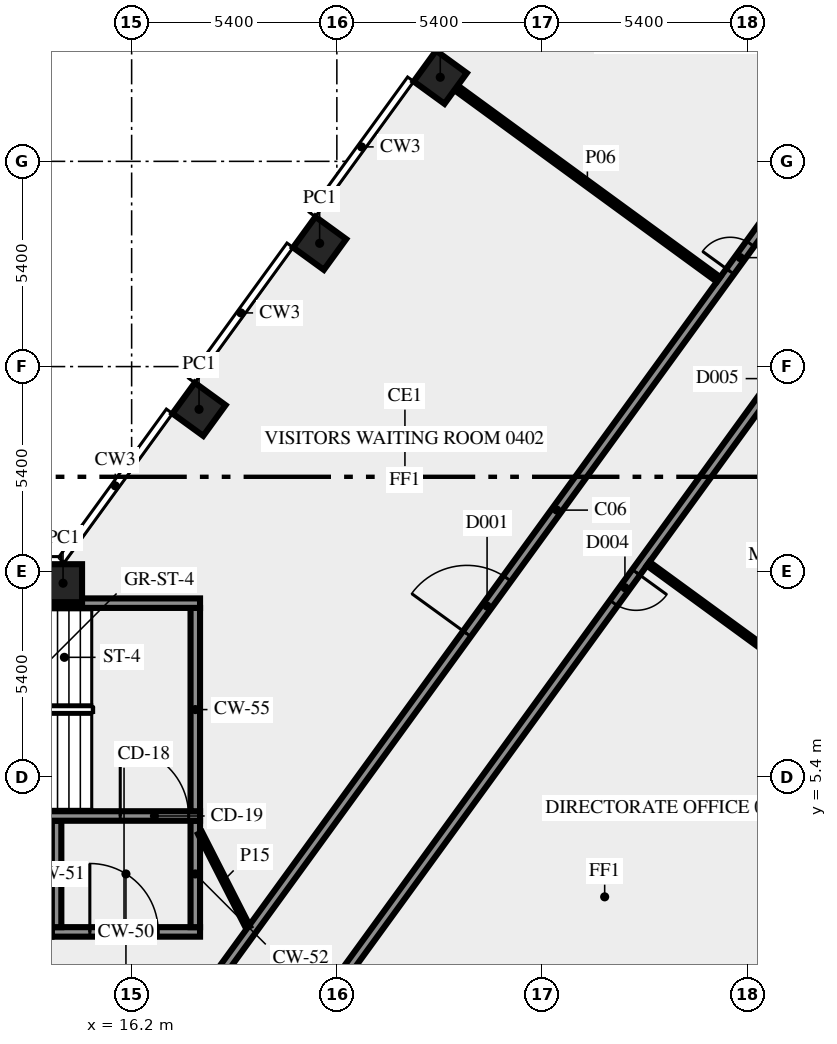
"""IFC4 building model, lengths in metres.
Left out: names, types, materials, properties, quantities, classifications, styles, units other than length and angle.
Written with IfcOpenShell. Run it as: python <this file> out.ifc"""

import sys

from ifc_helpers import new_model, si_unit, direction, frame, frame_2d, origin, origin_2d, place, context, subcontext, project, spatial, rectangle, extrude, element, fill, save


model = new_model("IFC4")
c1 = context("Model", 3, precision=1e-05, world=origin(), true_north=direction((0.0, 1.0)))
c2 = subcontext(c1, "Body", "Model", "MODEL_VIEW")
j1 = project(units=[si_unit("LENGTHUNIT", "METRE"), si_unit("PLANEANGLEUNIT", "RADIAN")], contexts=[c1])
p1 = place(None, origin())
s1 = spatial("IfcSite", under=j1, at=p1, CompositionType="ELEMENT")
p2 = place(p1, origin())
s2 = spatial("IfcBuilding", under=s1, at=p2, CompositionType="ELEMENT")
p3 = place(p2, frame((0.0, 0.0, 20.5)))
s3 = spatial("IfcBuildingStorey", under=s2, at=p3, CompositionType="ELEMENT", Elevation=20.5)
for number, where, z_axis, x_axis in (
    (1, (24.321, 23.812, 0.0), (0.0, 0.0, 1.0), (-0.588, -0.809, 0.0)),
    (2, (21.147, 19.444, 0.0), (0.0, 0.0, 1.0), (-0.588, -0.809, 0.0)),
    (3, (17.974, 15.075, 0.0), (0.0, 0.0, 1.0), (-0.588, -0.809, 0.0)),
    (4, (14.395, 10.5, 0.0), (0.0, 0.0, 1.0), (-1.0, 0.0, 0.0)),
):
    element("IfcColumn", number, at=place(p3, frame(where, z_axis=z_axis, x_axis=x_axis)), inside=s3, PredefinedType="COLUMN", context=c2, shape_type="SweptSolid", body=[
        extrude(rectangle(XDim=1.0, YDim=1.0, at=origin_2d()), origin(), (0.0, 0.0, 1.0), 3.9),
    ])
p4 = place(p3, frame((14.1, 1.325, 0.0), z_axis=(0.0, 0.0, 1.0), x_axis=(1.0, 0.0, 0.0)))
e5 = element("IfcWall", 5, at=p4, inside=s3, PredefinedType="SHEAR", context=c2, shape_type="SweptSolid", body=[
    extrude(rectangle(XDim=3.9, YDim=0.25, at=frame_2d((1.95, 0.0))), origin(), (0.0, 0.0, 1.0), 3.9),
])
p5 = place(p4, frame((1.0, 0.0, 0.0)))
e6 = element("IfcOpeningElement", 6, at=p5, cuts=e5, PredefinedType="OPENING", context=c2, shape_type="SweptSolid", body=[
    extrude(rectangle(XDim=1.8, YDim=2.1, at=frame_2d((0.9, 1.05))), frame((0.0, 0.135, 0.0), z_axis=(0.0, -1.0, 0.0), x_axis=(1.0, 0.0, 0.0)), (0.0, 0.0, 1.0), 0.27),
])
for number, where, z_axis, x_axis in (
    (7, (14.225, 1.45, 0.0), (0.0, 0.0, 1.0), (0.0, 1.0, 0.0)),
    (8, (17.875, 1.45, 0.0), (0.0, 0.0, 1.0), (0.0, 1.0, 0.0)),
):
    element("IfcWall", number, at=place(p3, frame(where, z_axis=z_axis, x_axis=x_axis)), inside=s3, PredefinedType="SHEAR", context=c2, shape_type="SweptSolid", body=[
        extrude(rectangle(XDim=2.8, YDim=0.25, at=frame_2d((1.4, 0.0))), origin(), (0.0, 0.0, 1.0), 3.9),
    ])
p6 = place(p3, frame((7.5, 4.375, 0.0), z_axis=(0.0, 0.0, 1.0), x_axis=(1.0, 0.0, 0.0)))
e9 = element("IfcWall", 9, at=p6, inside=s3, PredefinedType="SHEAR", context=c2, shape_type="SweptSolid", body=[
    extrude(rectangle(XDim=10.5, YDim=0.25, at=frame_2d((5.25, 0.0))), origin(), (0.0, 0.0, 1.0), 3.9),
])
p7 = place(p6, frame((8.4, 0.0, 0.0)))
e10 = element("IfcOpeningElement", 10, at=p7, cuts=e9, PredefinedType="OPENING", context=c2, shape_type="SweptSolid", body=[
    extrude(rectangle(XDim=1.8, YDim=2.1, at=frame_2d((0.9, 1.05))), frame((0.0, 0.135, 0.0), z_axis=(0.0, -1.0, 0.0), x_axis=(1.0, 0.0, 0.0)), (0.0, 0.0, 1.0), 0.27),
])
p8 = place(p3, frame((17.875, 4.5, 0.0), z_axis=(0.0, 0.0, 1.0), x_axis=(0.0, 1.0, 0.0)))
e11 = element("IfcWall", 11, at=p8, inside=s3, PredefinedType="SHEAR", context=c2, shape_type="SweptSolid", body=[
    extrude(rectangle(XDim=5.35, YDim=0.25, at=frame_2d((2.675, 0.0))), origin(), (0.0, 0.0, 1.0), 3.9),
])
p9 = place(p3, frame((7.5, 9.975, 0.0), z_axis=(0.0, 0.0, 1.0), x_axis=(1.0, 0.0, 0.0)))
e12 = element("IfcWall", 12, at=p9, inside=s3, PredefinedType="SHEAR", context=c2, shape_type="SweptSolid", body=[
    extrude(rectangle(XDim=10.5, YDim=0.25, at=frame_2d((5.25, 0.0))), origin(), (0.0, 0.0, 1.0), 3.9),
])
p10 = place(p9, frame((2.0, 0.0, 1.0)))
e13 = element("IfcOpeningElement", 13, at=p10, cuts=e12, PredefinedType="OPENING", context=c2, shape_type="SweptSolid", body=[
    extrude(rectangle(XDim=1.2, YDim=1.2, at=frame_2d((0.6, 0.6))), frame((0.0, 0.135, 0.0), z_axis=(0.0, -1.0, 0.0), x_axis=(1.0, 0.0, 0.0)), (0.0, 0.0, 1.0), 0.27),
])
p11 = place(p3, frame((49.869, 38.856, 0.0), z_axis=(0.0, 0.0, 1.0), x_axis=(-0.587784522481, -0.809017524614, 0.0)))
e14 = element("IfcWall", 14, at=p11, inside=s3, PredefinedType="SOLIDWALL", context=c2, shape_type="SweptSolid", body=[
    extrude(rectangle(XDim=49.912, YDim=0.25, at=frame_2d((24.956, 0.0))), origin(), (0.0, 0.0, 1.0), 3.9),
])
p12 = place(p11, frame((27.946, 0.0, 0.0)))
e15 = element("IfcOpeningElement", 15, at=p12, cuts=e14, PredefinedType="OPENING", context=c2, shape_type="SweptSolid", body=[
    extrude(rectangle(XDim=0.9, YDim=2.1, at=frame_2d((0.45, 1.05))), frame((0.0, 0.135, 0.0), z_axis=(0.0, -1.0, 0.0), x_axis=(1.0, 0.0, 0.0)), (0.0, 0.0, 1.0), 0.27),
])
p13 = place(p11, frame((34.697, 0.0, 0.0)))
e16 = element("IfcOpeningElement", 16, at=p13, cuts=e14, PredefinedType="OPENING", context=c2, shape_type="SweptSolid", body=[
    extrude(rectangle(XDim=1.0, YDim=2.1, at=frame_2d((0.5, 1.05))), frame((0.0, 0.135, 0.0), z_axis=(0.0, -1.0, 0.0), x_axis=(1.0, 0.0, 0.0)), (0.0, 0.0, 1.0), 0.27),
])
p14 = place(p11, frame((15.797, 0.0, 0.0)))
e17 = element("IfcOpeningElement", 17, at=p14, cuts=e14, PredefinedType="OPENING", context=c2, shape_type="SweptSolid", body=[
    extrude(rectangle(XDim=0.9, YDim=2.1, at=frame_2d((0.45, 1.05))), frame((0.0, 0.135, 0.0), z_axis=(0.0, -1.0, 0.0), x_axis=(1.0, 0.0, 0.0)), (0.0, 0.0, 1.0), 0.27),
])
p15 = place(p11, frame((14.196, 0.0, 0.0)))
e18 = element("IfcOpeningElement", 18, at=p15, cuts=e14, PredefinedType="OPENING", context=c2, shape_type="SweptSolid", body=[
    extrude(rectangle(XDim=0.9, YDim=2.1, at=frame_2d((0.45, 1.05))), frame((0.0, 0.135, 0.0), z_axis=(0.0, -1.0, 0.0), x_axis=(1.0, 0.0, 0.0)), (0.0, 0.0, 1.0), 0.27),
])
p16 = place(p3, frame((17.545, -1.125, 0.0), z_axis=(0.0, 0.0, 1.0), x_axis=(0.587786323093, 0.809016216391, 0.0)))
e19 = element("IfcWall", 19, at=p16, inside=s3, PredefinedType="SOLIDWALL", context=c2, shape_type="SweptSolid", body=[
    extrude(rectangle(XDim=33.493, YDim=0.25, at=frame_2d((16.747, 0.0))), origin(), (0.0, 0.0, 1.0), 3.9),
])
p17 = place(p16, frame((24.508, 0.0, 0.0)))
e20 = element("IfcOpeningElement", 20, at=p17, cuts=e19, PredefinedType="OPENING", context=c2, shape_type="SweptSolid", body=[
    extrude(rectangle(XDim=0.9, YDim=2.1, at=frame_2d((0.45, 1.05))), frame((0.0, 0.135, 0.0), z_axis=(0.0, -1.0, 0.0), x_axis=(1.0, 0.0, 0.0)), (0.0, 0.0, 1.0), 0.27),
])
p18 = place(p16, frame((12.724, 0.0, 0.0)))
e21 = element("IfcOpeningElement", 21, at=p18, cuts=e19, PredefinedType="OPENING", context=c2, shape_type="SweptSolid", body=[
    extrude(rectangle(XDim=1.8, YDim=2.1, at=frame_2d((0.9, 1.05))), frame((0.0, 0.135, 0.0), z_axis=(0.0, -1.0, 0.0), x_axis=(1.0, 0.0, 0.0)), (0.0, 0.0, 1.0), 0.27),
])
p19 = place(p3, frame((29.793, 11.012, 0.0), z_axis=(0.0, 0.0, 1.0), x_axis=(0.807645841498, -0.589667868135, 0.0)))
e22 = element("IfcWall", 22, at=p19, inside=s3, PredefinedType="PARTITIONING", context=c2, shape_type="SweptSolid", body=[
    extrude(rectangle(XDim=9.551, YDim=0.12, at=frame_2d((4.775, 0.0))), origin(), (0.0, 0.0, 1.0), 2.9),
])
p20 = place(p3, frame((24.742, 23.532, 0.0), z_axis=(0.0, 0.0, 1.0), x_axis=(0.80760412282, -0.589725004391, 0.0)))
e23 = element("IfcWall", 23, at=p20, inside=s3, PredefinedType="PARTITIONING", context=c2, shape_type="SweptSolid", body=[
    extrude(rectangle(XDim=8.545, YDim=0.15, at=frame_2d((4.272, 0.0))), origin(), (0.0, 0.0, 1.0), 3.9),
])
p21 = place(p3, frame((18.0, 3.925, 0.0), z_axis=(0.0, 0.0, 1.0), x_axis=(0.453950796792, -0.891026752736, 0.0)))
e24 = element("IfcWall", 24, at=p21, inside=s3, PredefinedType="PARTITIONING", context=c2, shape_type="SweptSolid", body=[
    extrude(rectangle(XDim=2.778, YDim=0.12, at=frame_2d((1.389, 0.0))), origin(), (0.0, 0.0, 1.0), 3.9),
])
p22 = place(p5, origin())
e25 = element("IfcDoor", 25, at=p22, inside=s3, OperationType="DOUBLE_DOOR_SINGLE_SWING", PredefinedType="DOOR", context=c2, shape_type="SweptSolid", body=[
    extrude(rectangle(XDim=1.8, YDim=2.1, at=frame_2d((0.9, 1.05))), frame((0.0, 0.025, 0.0), z_axis=(0.0, -1.0, 0.0), x_axis=(1.0, 0.0, 0.0)), (0.0, 0.0, 1.0), 0.05),
])
fill(e6, e25)
p23 = place(p7, origin())
e26 = element("IfcDoor", 26, at=p23, inside=s3, OperationType="DOUBLE_DOOR_SINGLE_SWING", PredefinedType="DOOR", context=c2, shape_type="SweptSolid", body=[
    extrude(rectangle(XDim=1.8, YDim=2.1, at=frame_2d((0.9, 1.05))), frame((0.0, 0.025, 0.0), z_axis=(0.0, -1.0, 0.0), x_axis=(1.0, 0.0, 0.0)), (0.0, 0.0, 1.0), 0.05),
])
fill(e10, e26)
p24 = place(p13, origin())
e27 = element("IfcDoor", 27, at=p24, inside=s3, OperationType="SINGLE_SWING_LEFT", PredefinedType="DOOR", context=c2, shape_type="SweptSolid", body=[
    extrude(rectangle(XDim=1.0, YDim=2.1, at=frame_2d((0.5, 1.05))), frame((0.0, 0.025, 0.0), z_axis=(0.0, -1.0, 0.0), x_axis=(1.0, 0.0, 0.0)), (0.0, 0.0, 1.0), 0.05),
])
fill(e16, e27)
p25 = place(p17, origin())
e28 = element("IfcDoor", 28, at=p25, inside=s3, OperationType="SINGLE_SWING_LEFT", PredefinedType="DOOR", context=c2, shape_type="SweptSolid", body=[
    extrude(rectangle(XDim=0.9, YDim=2.1, at=frame_2d((0.45, 1.05))), frame((0.0, 0.025, 0.0), z_axis=(0.0, -1.0, 0.0), x_axis=(1.0, 0.0, 0.0)), (0.0, 0.0, 1.0), 0.05),
])
fill(e20, e28)
p26 = place(p18, origin())
e29 = element("IfcDoor", 29, at=p26, inside=s3, OperationType="DOUBLE_DOOR_SINGLE_SWING", PredefinedType="DOOR", context=c2, shape_type="SweptSolid", body=[
    extrude(rectangle(XDim=1.8, YDim=2.1, at=frame_2d((0.9, 1.05))), frame((0.0, 0.025, 0.0), z_axis=(0.0, -1.0, 0.0), x_axis=(1.0, 0.0, 0.0)), (0.0, 0.0, 1.0), 0.05),
])
fill(e21, e29)
save(model, sys.argv[1])
